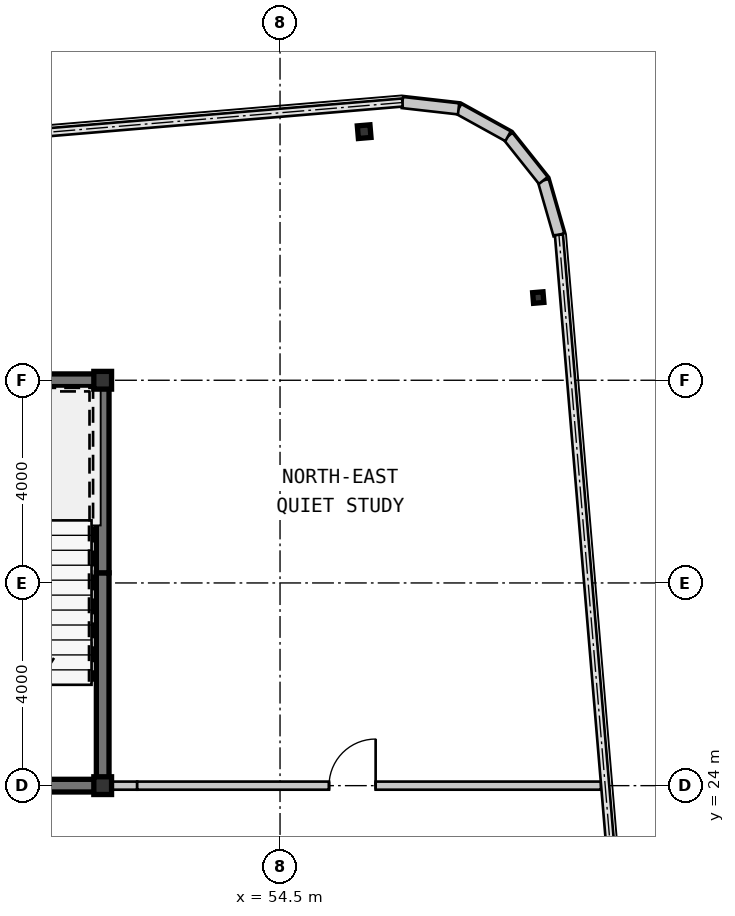
"""IFC4 building model, lengths in metres.
Left out: names, types, materials, properties, quantities, classifications, styles, units other than length and angle.
Written with IfcOpenShell. Run it as: python <this file> out.ifc"""

import sys

from ifc_helpers import new_model, si_unit, direction, frame, frame_2d, origin, origin_2d, place, context, subcontext, project, spatial, rectangle, hollow_rectangle, i_section, extrude, source, transform, mapped, element, fill, save


model = new_model("IFC4")
c1 = context("Model", 3, precision=1e-05, world=origin(), true_north=direction((0.0, 1.0)))
c2 = subcontext(c1, "Body", "Model", "MODEL_VIEW")
j1 = project(units=[si_unit("LENGTHUNIT", "METRE"), si_unit("PLANEANGLEUNIT", "RADIAN")], contexts=[c1])
p1 = place(None, origin())
s1 = spatial("IfcSite", under=j1, at=p1, CompositionType="ELEMENT")
p2 = place(p1, origin())
s2 = spatial("IfcBuilding", under=s1, at=p2, CompositionType="ELEMENT")
p3 = place(p2, frame((0.0, 0.0, 172.55)))
s3 = spatial("IfcBuildingStorey", under=s2, at=p3, CompositionType="ELEMENT", Elevation=172.55)
m1 = source(origin(), c2, "Body", "SweptSolid", [
    extrude(hollow_rectangle(XDim=0.35, YDim=0.35, WallThickness=0.016, at=origin_2d()), origin(), (0.0, 0.0, 1.0), 3.15),
])
for number, where, z_axis, x_axis in (
    (1, (51.0, 24.0, 0.0), (0.0, 0.0, 1.0), (1.0, 0.0, 0.0)),
    (2, (51.0, 32.0, 0.0), (0.0, 0.0, 1.0), (1.0, 0.0, 0.0)),
):
    element("IfcColumn", number, at=place(p3, frame(where, z_axis=z_axis, x_axis=x_axis)), inside=s3, PredefinedType="COLUMN", context=c2, shape_type="MappedRepresentation", body=[
        mapped(m1, transform((0.0, 0.0, 0.0), scale=1.0)),
    ])
m2 = source(origin(), c2, "Body", "SweptSolid", [
    extrude(hollow_rectangle(XDim=0.25, YDim=0.25, WallThickness=0.01, at=origin_2d()), origin(), (0.0, 0.0, 1.0), 3.15),
])
p4 = place(p3, frame((56.16, 36.906, 0.0), z_axis=(0.0, 0.0, 1.0), x_axis=(0.99649285925, 0.083677843332, 0.0)))
e3 = element("IfcColumn", 3, at=p4, inside=s3, PredefinedType="COLUMN", context=c2, shape_type="MappedRepresentation", body=[
    mapped(m2, transform((0.0, 0.0, 0.0), scale=1.0)),
])
m3 = source(origin(), c2, "Body", "SweptSolid", [
    extrude(i_section(OverallWidth=0.205, OverallDepth=0.21, WebThickness=0.009, FlangeThickness=0.014, at=origin_2d()), origin(), (0.0, 0.0, 1.0), 3.15),
])
p5 = place(p3, frame((59.596, 33.632, 0.0), z_axis=(0.0, 0.0, 1.0), x_axis=(0.99649285925, 0.083677843332, 0.0)))
e4 = element("IfcColumn", 4, at=p5, inside=s3, PredefinedType="COLUMN", context=c2, shape_type="MappedRepresentation", body=[
    mapped(m3, transform((0.0, 0.0, 0.0), scale=1.0)),
])
m4 = source(origin(), c2, "Body", "SweptSolid", [
    extrude(rectangle(XDim=1.116, YDim=0.22, at=frame_2d((0.558, 0.0))), origin(), (0.0, 0.0, 1.0), 2.93),
])
for number, where, z_axis, x_axis in (
    (5, (60.004, 34.87, 0.0), (0.0, 0.0, 1.0), (-0.277, 0.961, 0.0)),
    (6, (59.696, 35.943, 0.0), (0.0, 0.0, 1.0), (-0.623, 0.782, 0.0)),
    (7, (59.0, 36.816, 0.0), (0.0, 0.0, 1.0), (-0.875, 0.484, 0.0)),
    (8, (58.024, 37.356, 0.0), (0.0, 0.0, 1.0), (-0.994, 0.112, 0.0)),
):
    element("IfcWall", number, at=place(p3, frame(where, z_axis=z_axis, x_axis=x_axis)), inside=s3, PredefinedType="SOLIDWALL", context=c2, shape_type="MappedRepresentation", body=[
        mapped(m4, transform((0.0, 0.0, 0.0), scale=1.0)),
    ])
m5 = source(origin(), c2, "Body", "SweptSolid", [
    extrude(rectangle(XDim=11.925, YDim=0.25, at=frame_2d((5.962, 0.0))), origin(), (0.0, 0.0, 1.0), 2.93),
])
p6 = place(p3, frame((39.2, 32.0, 0.0), z_axis=(0.0, 0.0, 1.0), x_axis=(1.0, 0.0, 0.0)))
e9 = element("IfcWall", 9, at=p6, inside=s3, PredefinedType="SHEAR", context=c2, shape_type="MappedRepresentation", body=[
    mapped(m5, transform((0.0, 0.0, 0.0), scale=1.0)),
])
m6 = source(origin(), c2, "Body", "SweptSolid", [
    extrude(rectangle(XDim=4.075, YDim=0.25, at=frame_2d((2.038, 0.0))), origin(), (0.0, 0.0, 1.0), 2.93),
])
p7 = place(p3, frame((51.0, 24.125, 0.0), z_axis=(0.0, 0.0, 1.0), x_axis=(0.0, 1.0, 0.0)))
e10 = element("IfcWall", 10, at=p7, inside=s3, PredefinedType="SHEAR", context=c2, shape_type="MappedRepresentation", body=[
    mapped(m6, transform((0.0, 0.0, 0.0), scale=1.0)),
])
m7 = source(origin(), c2, "Body", "SweptSolid", [
    extrude(rectangle(XDim=3.675, YDim=0.25, at=frame_2d((1.837, 0.0))), origin(), (0.0, 0.0, 1.0), 2.93),
])
p8 = place(p3, frame((51.0, 28.2, 0.0), z_axis=(0.0, 0.0, 1.0), x_axis=(0.0, 1.0, 0.0)))
e11 = element("IfcWall", 11, at=p8, inside=s3, PredefinedType="SHEAR", context=c2, shape_type="MappedRepresentation", body=[
    mapped(m7, transform((0.0, 0.0, 0.0), scale=1.0)),
])
m8 = source(origin(), c2, "Body", "SweptSolid", [
    extrude(rectangle(XDim=4.85, YDim=0.25, at=frame_2d((2.425, 0.0))), origin(), (0.0, 0.0, 1.0), 2.93),
])
p9 = place(p3, frame((46.275, 24.0, 0.0), z_axis=(0.0, 0.0, 1.0), x_axis=(1.0, 0.0, 0.0)))
e12 = element("IfcWall", 12, at=p9, inside=s3, PredefinedType="SHEAR", context=c2, shape_type="MappedRepresentation", body=[
    mapped(m8, transform((0.0, 0.0, 0.0), scale=1.0)),
])
m9 = source(origin(), c2, "Body", "SweptSolid", [
    extrude(rectangle(XDim=0.556, YDim=0.16, at=frame_2d((0.278, 0.0))), origin(), (0.0, 0.0, 1.0), 2.47),
])
p10 = place(p3, frame((51.125, 24.0, 0.0), z_axis=(0.0, 0.0, 1.0), x_axis=(1.0, 0.0, 0.0)))
e13 = element("IfcWall", 13, at=p10, inside=s3, PredefinedType="PARTITIONING", context=c2, shape_type="MappedRepresentation", body=[
    mapped(m9, transform((0.0, 0.0, 0.0), scale=1.0)),
])
m10 = source(origin(), c2, "Body", "SweptSolid", [
    extrude(rectangle(XDim=9.153, YDim=0.16, at=frame_2d((4.576, 0.0))), origin(), (0.0, 0.0, 1.0), 2.93),
])
p11 = place(p3, frame((51.681, 24.0, 0.0), z_axis=(0.0, 0.0, 1.0), x_axis=(1.0, 0.0, 0.0)))
e14 = element("IfcWall", 14, at=p11, inside=s3, PredefinedType="PARTITIONING", context=c2, shape_type="MappedRepresentation", body=[
    mapped(m10, transform((0.0, 0.0, 0.0), scale=1.0)),
])
m11 = source(origin(), c2, "Body", "SweptSolid", [
    extrude(rectangle(XDim=0.92, YDim=2.1, at=frame_2d((0.46, 1.05))), frame((0.0, 0.09, 0.0), z_axis=(0.0, -1.0, 0.0), x_axis=(1.0, 0.0, 0.0)), (0.0, 0.0, 1.0), 0.18),
])
p12 = place(p11, frame((3.786, 0.0, 0.0)))
e15 = element("IfcOpeningElement", 15, at=p12, cuts=e14, PredefinedType="OPENING", context=c2, shape_type="MappedRepresentation", body=[
    mapped(m11, transform((0.0, 0.0, 0.0), scale=1.0)),
])
m12 = source(origin(), c2, "Body", "SweptSolid", [
    extrude(rectangle(XDim=0.92, YDim=2.1, at=frame_2d((0.46, 1.05))), frame((0.0, 0.025, 0.0), z_axis=(0.0, -1.0, 0.0), x_axis=(1.0, 0.0, 0.0)), (0.0, 0.0, 1.0), 0.05),
])
p13 = place(p12, origin())
e16 = element("IfcDoor", 16, at=p13, inside=s3, OperationType="SINGLE_SWING_RIGHT", PredefinedType="DOOR", context=c2, shape_type="MappedRepresentation", body=[
    mapped(m12, transform((0.0, 0.0, 0.0), scale=1.0)),
])
fill(e15, e16)
save(model, sys.argv[1])
